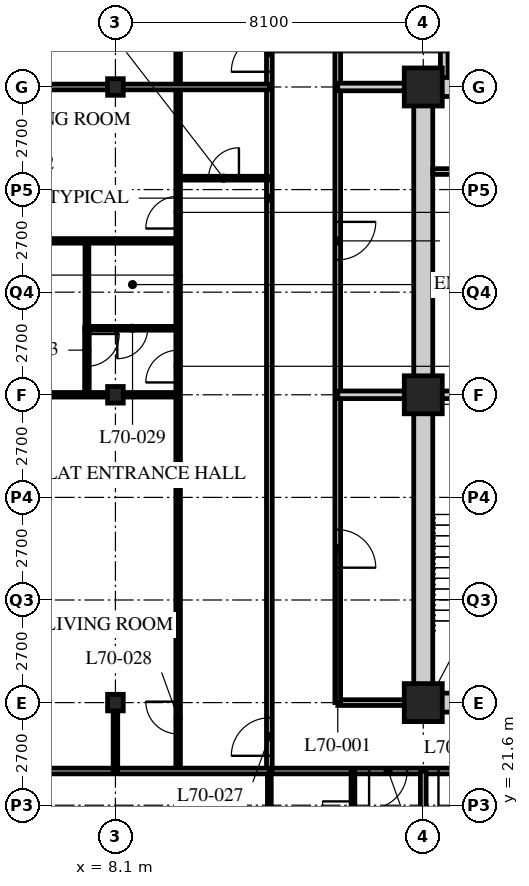
"""IFC4 building model, lengths in metres.
Left out: names, types, materials, properties, quantities, classifications, styles, units other than length and angle.
Written with IfcOpenShell. Run it as: python <this file> out.ifc"""

import sys

from ifc_helpers import new_model, si_unit, direction, frame, frame_2d, origin, origin_2d, place, context, subcontext, project, spatial, rectangle, hollow_rectangle, i_section, extrude, element, fill, save


model = new_model("IFC4")
c1 = context("Model", 3, precision=1e-05, world=origin(), true_north=direction((0.0, 1.0)))
c2 = subcontext(c1, "Body", "Model", "MODEL_VIEW")
j1 = project(units=[si_unit("LENGTHUNIT", "METRE"), si_unit("PLANEANGLEUNIT", "RADIAN")], contexts=[c1])
p1 = place(None, origin())
s1 = spatial("IfcSite", under=j1, at=p1, CompositionType="ELEMENT")
p2 = place(p1, origin())
s2 = spatial("IfcBuilding", under=s1, at=p2, CompositionType="ELEMENT")
p3 = place(p2, frame((0.0, 0.0, 273.6)))
s3 = spatial("IfcBuildingStorey", under=s2, at=p3, CompositionType="ELEMENT", Elevation=273.6)
for number, where, z_axis, x_axis in (
    (1, (8.1, 24.3, 0.0), (0.0, 0.0, 1.0), (1.0, 0.0, 0.0)),
    (2, (8.1, 32.4, 0.0), (0.0, 0.0, 1.0), (1.0, 0.0, 0.0)),
    (3, (8.1, 40.5, 0.0), (0.0, 0.0, 1.0), (1.0, 0.0, 0.0)),
):
    element("IfcColumn", number, at=place(p3, frame(where, z_axis=z_axis, x_axis=x_axis)), inside=s3, PredefinedType="COLUMN", context=c2, shape_type="SweptSolid", body=[
        extrude(i_section(OverallWidth=0.412, OverallDepth=0.437, WebThickness=0.036, FlangeThickness=0.058, FilletRadius=0.015, at=origin_2d()), origin(), (0.0, 0.0, 1.0), 3.9),
    ])
for number, where, z_axis, x_axis in (
    (4, (16.2, 24.3, 0.0), (0.0, 0.0, 1.0), (1.0, 0.0, 0.0)),
    (5, (16.2, 32.4, 0.0), (0.0, 0.0, 1.0), (1.0, 0.0, 0.0)),
    (6, (16.2, 40.5, 0.0), (0.0, 0.0, 1.0), (1.0, 0.0, 0.0)),
):
    element("IfcColumn", number, at=place(p3, frame(where, z_axis=z_axis, x_axis=x_axis)), inside=s3, PredefinedType="COLUMN", context=c2, shape_type="SweptSolid", body=[
        extrude(hollow_rectangle(XDim=1.0, YDim=1.0, WallThickness=0.1, at=origin_2d()), origin(), (0.0, 0.0, 1.0), 3.9),
    ])
p4 = place(p3, frame((12.15, 22.5, 0.0), z_axis=(0.0, 0.0, 1.0), x_axis=(1.0, 0.0, 0.0)))
e7 = element("IfcWall", 7, at=p4, inside=s3, PredefinedType="PARTITIONING", context=c2, shape_type="SweptSolid", body=[
    extrude(rectangle(XDim=24.3, YDim=0.15, at=frame_2d((12.15, 0.0))), origin(), (0.0, 0.0, 1.0), 3.69),
])
p5 = place(p4, frame((4.45, 0.0, 0.0)))
e8 = element("IfcOpeningElement", 8, at=p5, cuts=e7, PredefinedType="OPENING", context=c2, shape_type="SweptSolid", body=[
    extrude(rectangle(XDim=1.0, YDim=2.1, at=frame_2d((0.5, 1.05))), frame((0.0, 0.085, 0.0), z_axis=(0.0, -1.0, 0.0), x_axis=(1.0, 0.0, 0.0)), (0.0, 0.0, 1.0), 0.17),
])
p6 = place(p4, frame((12.55, 0.0, 0.0)))
e9 = element("IfcOpeningElement", 9, at=p6, cuts=e7, PredefinedType="OPENING", context=c2, shape_type="SweptSolid", body=[
    extrude(rectangle(XDim=1.0, YDim=2.1, at=frame_2d((0.5, 1.05))), frame((0.0, 0.085, 0.0), z_axis=(0.0, -1.0, 0.0), x_axis=(1.0, 0.0, 0.0)), (0.0, 0.0, 1.0), 0.17),
])
p7 = place(p4, frame((2.625, 0.0, 0.0)))
e10 = element("IfcOpeningElement", 10, at=p7, cuts=e7, PredefinedType="OPENING", context=c2, shape_type="SweptSolid", body=[
    extrude(rectangle(XDim=1.0, YDim=2.1, at=frame_2d((0.5, 1.05))), frame((0.0, 0.085, 0.0), z_axis=(0.0, -1.0, 0.0), x_axis=(1.0, 0.0, 0.0)), (0.0, 0.0, 1.0), 0.17),
])
p8 = place(p3, frame((12.15, 22.5, 0.0), z_axis=(0.0, 0.0, 1.0), x_axis=(0.0, 1.0, 0.0)))
e11 = element("IfcWall", 11, at=p8, inside=s3, PredefinedType="PARTITIONING", context=c2, shape_type="SweptSolid", body=[
    extrude(rectangle(XDim=30.15, YDim=0.15, at=frame_2d((15.075, 0.0))), origin(), (0.0, 0.0, 1.0), 3.69),
])
p9 = place(p8, frame((0.4, 0.0, 0.0)))
e12 = element("IfcOpeningElement", 12, at=p9, cuts=e11, PredefinedType="OPENING", context=c2, shape_type="SweptSolid", body=[
    extrude(rectangle(XDim=1.0, YDim=2.1, at=frame_2d((0.5, 1.05))), frame((0.0, 0.085, 0.0), z_axis=(0.0, -1.0, 0.0), x_axis=(1.0, 0.0, 0.0)), (0.0, 0.0, 1.0), 0.17),
])
p10 = place(p8, frame((18.4, 0.0, 0.0)))
e13 = element("IfcOpeningElement", 13, at=p10, cuts=e11, PredefinedType="OPENING", context=c2, shape_type="SweptSolid", body=[
    extrude(rectangle(XDim=1.0, YDim=2.1, at=frame_2d((0.5, 1.05))), frame((0.0, 0.085, 0.0), z_axis=(0.0, -1.0, 0.0), x_axis=(1.0, 0.0, 0.0)), (0.0, 0.0, 1.0), 0.17),
])
p11 = place(p8, frame((28.45, 0.0, 0.0)))
e14 = element("IfcOpeningElement", 14, at=p11, cuts=e11, PredefinedType="OPENING", context=c2, shape_type="SweptSolid", body=[
    extrude(rectangle(XDim=1.0, YDim=2.1, at=frame_2d((0.5, 1.05))), frame((0.0, 0.085, 0.0), z_axis=(0.0, -1.0, 0.0), x_axis=(1.0, 0.0, 0.0)), (0.0, 0.0, 1.0), 0.17),
])
p12 = place(p3, frame((16.0, 24.3, 0.0), z_axis=(0.0, 0.0, 1.0), x_axis=(-1.0, 0.0, 0.0)))
e15 = element("IfcWall", 15, at=p12, inside=s3, PredefinedType="PARTITIONING", context=c2, shape_type="SweptSolid", body=[
    extrude(rectangle(XDim=2.05, YDim=0.15, at=frame_2d((1.025, 0.0))), origin(), (0.0, 0.0, 1.0), 3.078),
])
p13 = place(p3, frame((13.95, 24.3, 0.0), z_axis=(0.0, 0.0, 1.0), x_axis=(0.0, 1.0, 0.0)))
e16 = element("IfcWall", 16, at=p13, inside=s3, PredefinedType="PARTITIONING", context=c2, shape_type="SweptSolid", body=[
    extrude(rectangle(XDim=26.55, YDim=0.15, at=frame_2d((13.275, 0.0))), origin(), (0.0, 0.0, 1.0), 3.69),
])
p14 = place(p13, frame((3.55, 0.0, 0.0)))
e17 = element("IfcOpeningElement", 17, at=p14, cuts=e16, PredefinedType="OPENING", context=c2, shape_type="SweptSolid", body=[
    extrude(rectangle(XDim=1.0, YDim=2.1, at=frame_2d((0.5, 1.05))), frame((0.0, 0.085, 0.0), z_axis=(0.0, -1.0, 0.0), x_axis=(1.0, 0.0, 0.0)), (0.0, 0.0, 1.0), 0.17),
])
p15 = place(p13, frame((11.65, 0.0, 0.0)))
e18 = element("IfcOpeningElement", 18, at=p15, cuts=e16, PredefinedType="OPENING", context=c2, shape_type="SweptSolid", body=[
    extrude(rectangle(XDim=1.0, YDim=2.1, at=frame_2d((0.5, 1.05))), frame((0.0, 0.085, 0.0), z_axis=(0.0, -1.0, 0.0), x_axis=(1.0, 0.0, 0.0)), (0.0, 0.0, 1.0), 0.17),
])
p16 = place(p3, frame((13.95, 32.4, 0.0), z_axis=(0.0, 0.0, 1.0), x_axis=(1.0, 0.0, 0.0)))
e19 = element("IfcWall", 19, at=p16, inside=s3, PredefinedType="SOLIDWALL", context=c2, shape_type="SweptSolid", body=[
    extrude(rectangle(XDim=2.25, YDim=0.2, at=frame_2d((1.125, 0.0))), origin(), (0.0, 0.0, 1.0), 3.078),
])
p17 = place(p3, frame((16.752, 50.85, 0.0), z_axis=(0.0, 0.0, 1.0), x_axis=(0.0, -1.0, 0.0)))
e20 = element("IfcWall", 20, at=p17, inside=s3, PredefinedType="SOLIDWALL", context=c2, shape_type="SweptSolid", body=[
    extrude(rectangle(XDim=10.35, YDim=0.2, at=frame_2d((5.175, 0.0))), origin(), (0.0, 0.0, 1.0), 3.69),
])
p18 = place(p3, frame((13.95, 40.5, 0.0), z_axis=(0.0, 0.0, 1.0), x_axis=(1.0, 0.0, 0.0)))
e21 = element("IfcWall", 21, at=p18, inside=s3, PredefinedType="SOLIDWALL", context=c2, shape_type="SweptSolid", body=[
    extrude(rectangle(XDim=2.25, YDim=0.2, at=frame_2d((1.125, 0.0))), origin(), (0.0, 0.0, 1.0), 3.078),
])
p19 = place(p3, frame((9.75, 22.5, 0.0), z_axis=(0.0, 0.0, 1.0), x_axis=(0.0, 1.0, 0.0)))
e22 = element("IfcWall", 22, at=p19, inside=s3, PredefinedType="PARTITIONING", context=c2, shape_type="SweptSolid", body=[
    extrude(rectangle(XDim=26.1, YDim=0.12, at=frame_2d((13.05, 0.0))), origin(), (0.0, 0.0, 1.0), 3.69),
])
p20 = place(p19, frame((0.975, 0.0, 0.0)))
e23 = element("IfcOpeningElement", 23, at=p20, cuts=e22, PredefinedType="OPENING", context=c2, shape_type="SweptSolid", body=[
    extrude(rectangle(XDim=0.85, YDim=2.1, at=frame_2d((0.425, 1.05))), frame((0.0, 0.07, 0.0), z_axis=(0.0, -1.0, 0.0), x_axis=(1.0, 0.0, 0.0)), (0.0, 0.0, 1.0), 0.14),
])
p21 = place(p19, frame((10.225, 0.0, 0.0)))
e24 = element("IfcOpeningElement", 24, at=p21, cuts=e22, PredefinedType="OPENING", context=c2, shape_type="SweptSolid", body=[
    extrude(rectangle(XDim=0.85, YDim=2.1, at=frame_2d((0.425, 1.05))), frame((0.0, 0.07, 0.0), z_axis=(0.0, -1.0, 0.0), x_axis=(1.0, 0.0, 0.0)), (0.0, 0.0, 1.0), 0.14),
])
p22 = place(p19, frame((14.275, 0.0, 0.0)))
e25 = element("IfcOpeningElement", 25, at=p22, cuts=e22, PredefinedType="OPENING", context=c2, shape_type="SweptSolid", body=[
    extrude(rectangle(XDim=0.85, YDim=2.1, at=frame_2d((0.425, 1.05))), frame((0.0, 0.07, 0.0), z_axis=(0.0, -1.0, 0.0), x_axis=(1.0, 0.0, 0.0)), (0.0, 0.0, 1.0), 0.14),
])
p23 = place(p19, frame((18.975, 0.0, 0.0)))
e26 = element("IfcOpeningElement", 26, at=p23, cuts=e22, PredefinedType="OPENING", context=c2, shape_type="SweptSolid", body=[
    extrude(rectangle(XDim=0.85, YDim=2.1, at=frame_2d((0.425, 1.05))), frame((0.0, 0.07, 0.0), z_axis=(0.0, -1.0, 0.0), x_axis=(1.0, 0.0, 0.0)), (0.0, 0.0, 1.0), 0.14),
])
p24 = place(p19, frame((22.375, 0.0, 0.0)))
e27 = element("IfcOpeningElement", 27, at=p24, cuts=e22, PredefinedType="OPENING", context=c2, shape_type="SweptSolid", body=[
    extrude(rectangle(XDim=0.85, YDim=2.1, at=frame_2d((0.425, 1.05))), frame((0.0, 0.07, 0.0), z_axis=(0.0, -1.0, 0.0), x_axis=(1.0, 0.0, 0.0)), (0.0, 0.0, 1.0), 0.14),
])
p25 = place(p3, frame((12.15, 38.1, 0.0), z_axis=(0.0, 0.0, 1.0), x_axis=(-1.0, 0.0, 0.0)))
e28 = element("IfcWall", 28, at=p25, inside=s3, PredefinedType="PARTITIONING", context=c2, shape_type="SweptSolid", body=[
    extrude(rectangle(XDim=2.4, YDim=0.1, at=frame_2d((1.2, 0.0))), origin(), (0.0, 0.0, 1.0), 3.69),
])
p26 = place(p25, frame((0.8, 0.0, 0.0)))
e29 = element("IfcOpeningElement", 29, at=p26, cuts=e28, PredefinedType="OPENING", context=c2, shape_type="SweptSolid", body=[
    extrude(rectangle(XDim=0.8, YDim=2.1, at=frame_2d((0.4, 1.05))), frame((0.0, 0.06, 0.0), z_axis=(0.0, -1.0, 0.0), x_axis=(1.0, 0.0, 0.0)), (0.0, 0.0, 1.0), 0.12),
])
p27 = place(p3, frame((9.75, 34.15, 0.0), z_axis=(0.0, 0.0, 1.0), x_axis=(-1.0, 0.0, 0.0)))
e30 = element("IfcWall", 30, at=p27, inside=s3, PredefinedType="PARTITIONING", context=c2, shape_type="SweptSolid", body=[
    extrude(rectangle(XDim=2.4, YDim=0.1, at=frame_2d((1.2, 0.0))), origin(), (0.0, 0.0, 1.0), 3.69),
])
p28 = place(p27, frame((0.8, 0.0, 0.0)))
e31 = element("IfcOpeningElement", 31, at=p28, cuts=e30, PredefinedType="OPENING", context=c2, shape_type="SweptSolid", body=[
    extrude(rectangle(XDim=0.8, YDim=2.1, at=frame_2d((0.4, 1.05))), frame((0.0, 0.06, 0.0), z_axis=(0.0, -1.0, 0.0), x_axis=(1.0, 0.0, 0.0)), (0.0, 0.0, 1.0), 0.12),
])
p29 = place(p3, frame((7.35, 34.15, 0.0), z_axis=(0.0, 0.0, 1.0), x_axis=(0.0, 1.0, 0.0)))
e32 = element("IfcWall", 32, at=p29, inside=s3, PredefinedType="PARTITIONING", context=c2, shape_type="SweptSolid", body=[
    extrude(rectangle(XDim=2.3, YDim=0.1, at=frame_2d((1.15, 0.0))), origin(), (0.0, 0.0, 1.0), 3.69),
])
p30 = place(p3, frame((9.75, 32.4, 0.0), z_axis=(0.0, 0.0, 1.0), x_axis=(-1.0, 0.0, 0.0)))
e33 = element("IfcWall", 33, at=p30, inside=s3, PredefinedType="PARTITIONING", context=c2, shape_type="SweptSolid", body=[
    extrude(rectangle(XDim=9.45, YDim=0.12, at=frame_2d((4.725, 0.0))), origin(), (0.0, 0.0, 1.0), 3.078),
])
p31 = place(p3, frame((9.75, 36.45, 0.0), z_axis=(0.0, 0.0, 1.0), x_axis=(-1.0, 0.0, 0.0)))
e34 = element("IfcWall", 34, at=p31, inside=s3, PredefinedType="PARTITIONING", context=c2, shape_type="SweptSolid", body=[
    extrude(rectangle(XDim=9.45, YDim=0.12, at=frame_2d((4.725, 0.0))), origin(), (0.0, 0.0, 1.0), 3.69),
])
p32 = place(p3, frame((12.15, 40.5, 0.0), z_axis=(0.0, 0.0, 1.0), x_axis=(-1.0, 0.0, 0.0)))
e35 = element("IfcWall", 35, at=p32, inside=s3, PredefinedType="PARTITIONING", context=c2, shape_type="SweptSolid", body=[
    extrude(rectangle(XDim=11.85, YDim=0.15, at=frame_2d((5.925, 0.0))), origin(), (0.0, 0.0, 1.0), 3.078),
])
p33 = place(p3, frame((14.35, 22.5, 0.0), z_axis=(0.0, 0.0, 1.0), x_axis=(0.0, -1.0, 0.0)))
e36 = element("IfcWall", 36, at=p33, inside=s3, PredefinedType="PARTITIONING", context=c2, shape_type="SweptSolid", body=[
    extrude(rectangle(XDim=2.4, YDim=0.1, at=frame_2d((1.2, 0.0))), origin(), (0.0, 0.0, 1.0), 3.69),
])
p34 = place(p33, frame((0.8, 0.0, 0.0)))
e37 = element("IfcOpeningElement", 37, at=p34, cuts=e36, PredefinedType="OPENING", context=c2, shape_type="SweptSolid", body=[
    extrude(rectangle(XDim=0.8, YDim=2.1, at=frame_2d((0.4, 1.05))), frame((0.0, 0.06, 0.0), z_axis=(0.0, -1.0, 0.0), x_axis=(1.0, 0.0, 0.0)), (0.0, 0.0, 1.0), 0.12),
])
p35 = place(p3, frame((12.15, 22.5, 0.0), z_axis=(0.0, 0.0, 1.0), x_axis=(0.0, -1.0, 0.0)))
e38 = element("IfcWall", 38, at=p35, inside=s3, PredefinedType="PARTITIONING", context=c2, shape_type="SweptSolid", body=[
    extrude(rectangle(XDim=2.4, YDim=0.1, at=frame_2d((1.2, 0.0))), origin(), (0.0, 0.0, 1.0), 3.69),
])
p36 = place(p3, frame((4.35, 22.5, 0.0), z_axis=(0.0, 0.0, 1.0), x_axis=(1.0, 0.0, 0.0)))
e39 = element("IfcWall", 39, at=p36, inside=s3, PredefinedType="PARTITIONING", context=c2, shape_type="SweptSolid", body=[
    extrude(rectangle(XDim=7.8, YDim=0.15, at=frame_2d((3.9, 0.0))), origin(), (0.0, 0.0, 1.0), 3.69),
])
p37 = place(p3, frame((16.2, 22.5, 0.0), z_axis=(0.0, 0.0, 1.0), x_axis=(0.0, -1.0, 0.0)))
e40 = element("IfcWall", 40, at=p37, inside=s3, PredefinedType="PARTITIONING", context=c2, shape_type="SweptSolid", body=[
    extrude(rectangle(XDim=6.0, YDim=0.15, at=frame_2d((3.0, 0.0))), origin(), (0.0, 0.0, 1.0), 3.078),
])
p38 = place(p3, frame((7.35, 32.4, 0.0), z_axis=(0.0, 0.0, 1.0), x_axis=(0.0, 1.0, 0.0)))
e41 = element("IfcWall", 41, at=p38, inside=s3, PredefinedType="PARTITIONING", context=c2, shape_type="SweptSolid", body=[
    extrude(rectangle(XDim=1.76, YDim=0.12, at=frame_2d((0.88, 0.0))), origin(), (0.0, 0.0, 1.0), 3.69),
])
p39 = place(p38, frame((0.75, 0.0, 0.0)))
e42 = element("IfcOpeningElement", 42, at=p39, cuts=e41, PredefinedType="OPENING", context=c2, shape_type="SweptSolid", body=[
    extrude(rectangle(XDim=0.85, YDim=2.1, at=frame_2d((0.425, 1.05))), frame((0.0, 0.07, 0.0), z_axis=(0.0, -1.0, 0.0), x_axis=(1.0, 0.0, 0.0)), (0.0, 0.0, 1.0), 0.14),
])
p40 = place(p3, frame((8.1, 22.5, 0.0), z_axis=(0.0, 0.0, 1.0), x_axis=(0.0, 1.0, 0.0)))
e43 = element("IfcWall", 43, at=p40, inside=s3, PredefinedType="PARTITIONING", context=c2, shape_type="SweptSolid", body=[
    extrude(rectangle(XDim=1.597, YDim=0.12, at=frame_2d((0.798, 0.0))), origin(), (0.0, 0.0, 1.0), 3.078),
])
p41 = place(p3, frame((15.95, 24.3, 0.0), z_axis=(0.0, 0.0, 1.0), x_axis=(1.0, 0.0, 0.0)))
e44 = element("IfcWall", 44, at=p41, inside=s3, PredefinedType="SOLIDWALL", context=c2, shape_type="SweptSolid", body=[
    extrude(rectangle(XDim=24.55, YDim=0.5, at=frame_2d((12.275, 0.0))), origin(), (0.0, 0.0, 1.0), 3.04),
])
p42 = place(p41, frame((11.5, 0.0, 0.0)))
e45 = element("IfcOpeningElement", 45, at=p42, cuts=e44, PredefinedType="OPENING", context=c2, shape_type="SweptSolid", body=[
    extrude(rectangle(XDim=1.8, YDim=2.4, at=frame_2d((0.9, 1.2))), frame((0.0, 0.26, 0.0), z_axis=(0.0, -1.0, 0.0), x_axis=(1.0, 0.0, 0.0)), (0.0, 0.0, 1.0), 0.52),
])
p43 = place(p3, frame((15.95, 40.5, 0.0), z_axis=(0.0, 0.0, 1.0), x_axis=(1.0, 0.0, 0.0)))
e46 = element("IfcWall", 46, at=p43, inside=s3, PredefinedType="SOLIDWALL", context=c2, shape_type="SweptSolid", body=[
    extrude(rectangle(XDim=24.55, YDim=0.5, at=frame_2d((12.275, 0.0))), origin(), (0.0, 0.0, 1.0), 3.04),
])
p44 = place(p43, frame((11.5, 0.0, 0.0)))
e47 = element("IfcOpeningElement", 47, at=p44, cuts=e46, PredefinedType="OPENING", context=c2, shape_type="SweptSolid", body=[
    extrude(rectangle(XDim=1.8, YDim=2.4, at=frame_2d((0.9, 1.2))), frame((0.0, 0.26, 0.0), z_axis=(0.0, -1.0, 0.0), x_axis=(1.0, 0.0, 0.0)), (0.0, 0.0, 1.0), 0.52),
])
p45 = place(p3, frame((16.2, 24.55, 0.0), z_axis=(0.0, 0.0, 1.0), x_axis=(0.0, 1.0, 0.0)))
e48 = element("IfcWall", 48, at=p45, inside=s3, PredefinedType="SOLIDWALL", context=c2, shape_type="SweptSolid", body=[
    extrude(rectangle(XDim=15.7, YDim=0.5, at=frame_2d((7.85, 0.0))), origin(), (0.0, 0.0, 1.0), 3.078),
])
p46 = place(p3, frame((16.45, 32.4, 0.0), z_axis=(0.0, 0.0, 1.0), x_axis=(1.0, 0.0, 0.0)))
e49 = element("IfcWall", 49, at=p46, inside=s3, PredefinedType="SOLIDWALL", context=c2, shape_type="SweptSolid", body=[
    extrude(rectangle(XDim=7.95, YDim=0.2, at=frame_2d((3.975, 0.0))), origin(), (0.0, 0.0, 1.0), 3.078),
])
p47 = place(p3, frame((16.45, 38.275, 0.0), z_axis=(0.0, 0.0, 1.0), x_axis=(1.0, 0.0, 0.0)))
e50 = element("IfcWall", 50, at=p47, inside=s3, PredefinedType="PARTITIONING", context=c2, shape_type="SweptSolid", body=[
    extrude(rectangle(XDim=7.75, YDim=0.15, at=frame_2d((3.875, 0.0))), origin(), (0.0, 0.0, 1.0), 3.69),
])
p48 = place(p14, origin())
e51 = element("IfcDoor", 51, at=p48, inside=s3, OperationType="SINGLE_SWING_RIGHT", PredefinedType="DOOR", context=c2, shape_type="SweptSolid", body=[
    extrude(rectangle(XDim=1.0, YDim=2.1, at=frame_2d((0.5, 1.05))), frame((0.0, 0.025, 0.0), z_axis=(0.0, -1.0, 0.0), x_axis=(1.0, 0.0, 0.0)), (0.0, 0.0, 1.0), 0.05),
])
fill(e17, e51)
p49 = place(p15, origin())
e52 = element("IfcDoor", 52, at=p49, inside=s3, OperationType="SINGLE_SWING_LEFT", PredefinedType="DOOR", context=c2, shape_type="SweptSolid", body=[
    extrude(rectangle(XDim=1.0, YDim=2.1, at=frame_2d((0.5, 1.05))), frame((0.0, 0.025, 0.0), z_axis=(0.0, -1.0, 0.0), x_axis=(1.0, 0.0, 0.0)), (0.0, 0.0, 1.0), 0.05),
])
fill(e18, e52)
p50 = place(p5, origin())
e53 = element("IfcDoor", 53, at=p50, inside=s3, OperationType="SINGLE_SWING_RIGHT", PredefinedType="DOOR", context=c2, shape_type="SweptSolid", body=[
    extrude(rectangle(XDim=1.0, YDim=2.1, at=frame_2d((0.5, 1.05))), frame((0.0, 0.025, 0.0), z_axis=(0.0, -1.0, 0.0), x_axis=(1.0, 0.0, 0.0)), (0.0, 0.0, 1.0), 0.05),
])
fill(e8, e53)
p51 = place(p26, origin())
e54 = element("IfcDoor", 54, at=p51, inside=s3, OperationType="SINGLE_SWING_RIGHT", PredefinedType="DOOR", context=c2, shape_type="SweptSolid", body=[
    extrude(rectangle(XDim=0.8, YDim=2.1, at=frame_2d((0.4, 1.05))), frame((0.0, 0.025, 0.0), z_axis=(0.0, -1.0, 0.0), x_axis=(1.0, 0.0, 0.0)), (0.0, 0.0, 1.0), 0.05),
])
fill(e29, e54)
p52 = place(p9, origin())
e55 = element("IfcDoor", 55, at=p52, inside=s3, OperationType="SINGLE_SWING_LEFT", PredefinedType="DOOR", context=c2, shape_type="SweptSolid", body=[
    extrude(rectangle(XDim=1.0, YDim=2.1, at=frame_2d((0.5, 1.05))), frame((0.0, 0.025, 0.0), z_axis=(0.0, -1.0, 0.0), x_axis=(1.0, 0.0, 0.0)), (0.0, 0.0, 1.0), 0.05),
])
fill(e12, e55)
p53 = place(p20, origin())
e56 = element("IfcDoor", 56, at=p53, inside=s3, OperationType="SINGLE_SWING_RIGHT", PredefinedType="DOOR", context=c2, shape_type="SweptSolid", body=[
    extrude(rectangle(XDim=0.85, YDim=2.1, at=frame_2d((0.425, 1.05))), frame((0.0, 0.025, 0.0), z_axis=(0.0, -1.0, 0.0), x_axis=(1.0, 0.0, 0.0)), (0.0, 0.0, 1.0), 0.05),
])
fill(e23, e56)
p54 = place(p28, origin())
e57 = element("IfcDoor", 57, at=p54, inside=s3, OperationType="SINGLE_SWING_RIGHT", PredefinedType="DOOR", context=c2, shape_type="SweptSolid", body=[
    extrude(rectangle(XDim=0.8, YDim=2.1, at=frame_2d((0.4, 1.05))), frame((0.0, 0.025, 0.0), z_axis=(0.0, -1.0, 0.0), x_axis=(1.0, 0.0, 0.0)), (0.0, 0.0, 1.0), 0.05),
])
fill(e31, e57)
p55 = place(p21, origin())
e58 = element("IfcDoor", 58, at=p55, inside=s3, OperationType="SINGLE_SWING_LEFT", PredefinedType="DOOR", context=c2, shape_type="SweptSolid", body=[
    extrude(rectangle(XDim=0.85, YDim=2.1, at=frame_2d((0.425, 1.05))), frame((0.0, 0.025, 0.0), z_axis=(0.0, -1.0, 0.0), x_axis=(1.0, 0.0, 0.0)), (0.0, 0.0, 1.0), 0.05),
])
fill(e24, e58)
p56 = place(p22, origin())
e59 = element("IfcDoor", 59, at=p56, inside=s3, OperationType="SINGLE_SWING_LEFT", PredefinedType="DOOR", context=c2, shape_type="SweptSolid", body=[
    extrude(rectangle(XDim=0.85, YDim=2.1, at=frame_2d((0.425, 1.05))), frame((0.0, 0.025, 0.0), z_axis=(0.0, -1.0, 0.0), x_axis=(1.0, 0.0, 0.0)), (0.0, 0.0, 1.0), 0.05),
])
fill(e25, e59)
p57 = place(p10, origin())
e60 = element("IfcDoor", 60, at=p57, inside=s3, OperationType="SINGLE_SWING_LEFT", PredefinedType="DOOR", context=c2, shape_type="SweptSolid", body=[
    extrude(rectangle(XDim=1.0, YDim=2.1, at=frame_2d((0.5, 1.05))), frame((0.0, 0.025, 0.0), z_axis=(0.0, -1.0, 0.0), x_axis=(1.0, 0.0, 0.0)), (0.0, 0.0, 1.0), 0.05),
])
fill(e13, e60)
p58 = place(p34, origin())
e61 = element("IfcDoor", 61, at=p58, inside=s3, OperationType="SINGLE_SWING_RIGHT", PredefinedType="DOOR", context=c2, shape_type="SweptSolid", body=[
    extrude(rectangle(XDim=0.8, YDim=2.1, at=frame_2d((0.4, 1.05))), frame((0.0, 0.025, 0.0), z_axis=(0.0, -1.0, 0.0), x_axis=(1.0, 0.0, 0.0)), (0.0, 0.0, 1.0), 0.05),
])
fill(e37, e61)
p59 = place(p7, origin())
e62 = element("IfcDoor", 62, at=p59, inside=s3, OperationType="SINGLE_SWING_RIGHT", PredefinedType="DOOR", context=c2, shape_type="SweptSolid", body=[
    extrude(rectangle(XDim=1.0, YDim=2.1, at=frame_2d((0.5, 1.05))), frame((0.0, 0.025, 0.0), z_axis=(0.0, -1.0, 0.0), x_axis=(1.0, 0.0, 0.0)), (0.0, 0.0, 1.0), 0.05),
])
fill(e10, e62)
p60 = place(p39, origin())
e63 = element("IfcDoor", 63, at=p60, inside=s3, OperationType="SINGLE_SWING_LEFT", PredefinedType="DOOR", context=c2, shape_type="SweptSolid", body=[
    extrude(rectangle(XDim=0.85, YDim=2.1, at=frame_2d((0.425, 1.05))), frame((0.0, 0.025, 0.0), z_axis=(0.0, -1.0, 0.0), x_axis=(1.0, 0.0, 0.0)), (0.0, 0.0, 1.0), 0.05),
])
fill(e42, e63)
save(model, sys.argv[1])
